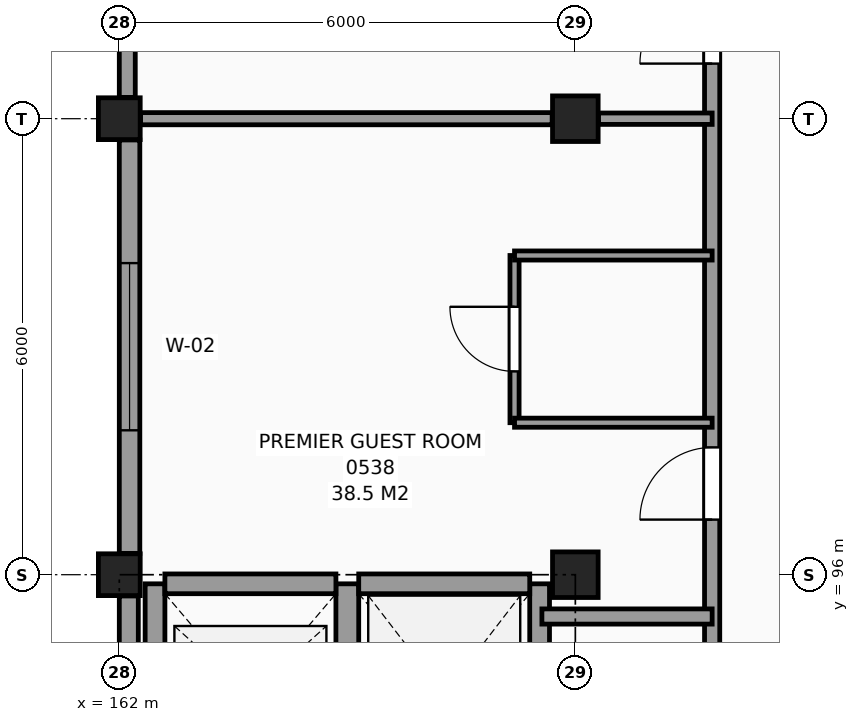
"""IFC4 building model, lengths in metres.
Left out: names, types, materials, properties, quantities, classifications, styles, units other than length and angle.
Written with IfcOpenShell. Run it as: python <this file> out.ifc"""

import sys

from ifc_helpers import new_model, si_unit, direction, frame, frame_2d, origin, origin_2d, place, context, subcontext, project, spatial, rectangle, extrude, element, fill, save


model = new_model("IFC4")
c1 = context("Model", 3, precision=1e-05, world=origin(), true_north=direction((0.0, 1.0)))
c2 = subcontext(c1, "Body", "Model", "MODEL_VIEW")
j1 = project(units=[si_unit("LENGTHUNIT", "METRE"), si_unit("PLANEANGLEUNIT", "RADIAN")], contexts=[c1])
p1 = place(None, origin())
s1 = spatial("IfcSite", under=j1, at=p1, CompositionType="ELEMENT")
p2 = place(p1, origin())
s2 = spatial("IfcBuilding", under=s1, at=p2, CompositionType="ELEMENT")
p3 = place(p2, frame((0.0, 0.0, 24.6)))
s3 = spatial("IfcBuildingStorey", under=s2, at=p3, CompositionType="ELEMENT", Elevation=24.6)
for number, where, z_axis, x_axis in (
    (1, (162.0, 96.0, 0.0), (0.0, 0.0, 1.0), (1.0, 0.0, 0.0)),
    (2, (162.0, 102.0, 0.0), (0.0, 0.0, 1.0), (1.0, 0.0, 0.0)),
):
    element("IfcColumn", number, at=place(p3, frame(where, z_axis=z_axis, x_axis=x_axis)), inside=s3, PredefinedType="COLUMN", context=c2, shape_type="SweptSolid", body=[
        extrude(rectangle(XDim=0.55, YDim=0.55, at=origin_2d()), origin(), (0.0, 0.0, 1.0), 3.6),
    ])
for number, where, z_axis, x_axis in (
    (3, (168.0, 96.0, 0.0), (0.0, 0.0, 1.0), (1.0, 0.0, 0.0)),
    (4, (168.0, 102.0, 0.0), (0.0, 0.0, 1.0), (1.0, 0.0, 0.0)),
):
    element("IfcColumn", number, at=place(p3, frame(where, z_axis=z_axis, x_axis=x_axis)), inside=s3, PredefinedType="COLUMN", context=c2, shape_type="SweptSolid", body=[
        extrude(rectangle(XDim=0.6, YDim=0.6, at=origin_2d()), origin(), (0.0, 0.0, 1.0), 3.6),
    ])
p4 = place(p3, frame((162.105, 107.72, 0.0), z_axis=(0.0, 0.0, 1.0), x_axis=(0.0, -1.0, 0.0)))
e5 = element("IfcWall", 5, at=p4, inside=s3, PredefinedType="SOLIDWALL", context=c2, shape_type="SweptSolid", body=[
    extrude(rectangle(XDim=5.44, YDim=0.21, at=frame_2d((2.72, 0.0))), origin(), (0.0, 0.0, 1.0), 2.73),
])
p5 = place(p4, frame((1.62, 0.0, 0.8)))
e6 = element("IfcOpeningElement", 6, at=p5, cuts=e5, PredefinedType="OPENING", context=c2, shape_type="SweptSolid", body=[
    extrude(rectangle(XDim=2.2, YDim=1.75, at=frame_2d((1.1, 0.875))), frame((0.0, 0.115, 0.0), z_axis=(0.0, -1.0, 0.0), x_axis=(1.0, 0.0, 0.0)), (0.0, 0.0, 1.0), 0.23),
])
p6 = place(p3, frame((162.135, 101.72, 0.0), z_axis=(0.0, 0.0, 1.0), x_axis=(0.0, -1.0, 0.0)))
e7 = element("IfcWall", 7, at=p6, inside=s3, PredefinedType="SOLIDWALL", context=c2, shape_type="SweptSolid", body=[
    extrude(rectangle(XDim=5.44, YDim=0.27, at=frame_2d((2.72, 0.0))), origin(), (0.0, 0.0, 1.0), 2.73),
])
p7 = place(p6, frame((1.62, 0.0, 0.8)))
e8 = element("IfcOpeningElement", 8, at=p7, cuts=e7, PredefinedType="OPENING", context=c2, shape_type="SweptSolid", body=[
    extrude(rectangle(XDim=2.2, YDim=1.75, at=frame_2d((1.1, 0.875))), frame((0.0, 0.145, 0.0), z_axis=(0.0, -1.0, 0.0), x_axis=(1.0, 0.0, 0.0)), (0.0, 0.0, 1.0), 0.29),
])
p8 = place(p3, frame((162.125, 95.72, 0.0), z_axis=(0.0, 0.0, 1.0), x_axis=(0.0, -1.0, 0.0)))
e9 = element("IfcWall", 9, at=p8, inside=s3, PredefinedType="SOLIDWALL", context=c2, shape_type="SweptSolid", body=[
    extrude(rectangle(XDim=5.44, YDim=0.25, at=frame_2d((2.72, 0.0))), origin(), (0.0, 0.0, 1.0), 2.73),
])
p9 = place(p3, frame((162.47, 92.97, 0.0), z_axis=(0.0, 0.0, 1.0), x_axis=(0.0, 1.0, 0.0)))
e10 = element("IfcWall", 10, at=p9, inside=s3, PredefinedType="SHEAR", context=c2, shape_type="SweptSolid", body=[
    extrude(rectangle(XDim=2.91, YDim=0.26, at=frame_2d((1.455, 0.0))), origin(), (0.0, 0.0, 1.0), 3.6),
])
p10 = place(p3, frame((165.0, 92.97, 0.0), z_axis=(0.0, 0.0, 1.0), x_axis=(0.0, 1.0, 0.0)))
e11 = element("IfcWall", 11, at=p10, inside=s3, PredefinedType="SHEAR", context=c2, shape_type="SweptSolid", body=[
    extrude(rectangle(XDim=2.91, YDim=0.3, at=frame_2d((1.455, 0.0))), origin(), (0.0, 0.0, 1.0), 3.6),
])
p11 = place(p3, frame((162.6, 95.88, 0.0), z_axis=(0.0, 0.0, 1.0), x_axis=(1.0, 0.0, 0.0)))
e12 = element("IfcWall", 12, at=p11, inside=s3, PredefinedType="SHEAR", context=c2, shape_type="SweptSolid", body=[
    extrude(rectangle(XDim=2.25, YDim=0.26, at=frame_2d((1.125, 0.0))), origin(), (0.0, 0.0, 1.0), 3.6),
])
p12 = place(p3, frame((167.53, 92.97, 0.0), z_axis=(0.0, 0.0, 1.0), x_axis=(0.0, 1.0, 0.0)))
e13 = element("IfcWall", 13, at=p12, inside=s3, PredefinedType="SHEAR", context=c2, shape_type="SweptSolid", body=[
    extrude(rectangle(XDim=2.91, YDim=0.26, at=frame_2d((1.455, 0.0))), origin(), (0.0, 0.0, 1.0), 3.6),
])
p13 = place(p3, frame((165.15, 95.88, 0.0), z_axis=(0.0, 0.0, 1.0), x_axis=(1.0, 0.0, 0.0)))
e14 = element("IfcWall", 14, at=p13, inside=s3, PredefinedType="SHEAR", context=c2, shape_type="SweptSolid", body=[
    extrude(rectangle(XDim=2.25, YDim=0.26, at=frame_2d((1.125, 0.0))), origin(), (0.0, 0.0, 1.0), 3.6),
])
p14 = place(p3, frame((167.2, 98.0, 0.0), z_axis=(0.0, 0.0, 1.0), x_axis=(0.0, 1.0, 0.0)))
e15 = element("IfcWall", 15, at=p14, inside=s3, PredefinedType="PARTITIONING", context=c2, shape_type="SweptSolid", body=[
    extrude(rectangle(XDim=2.2, YDim=0.12, at=frame_2d((1.1, 0.0))), origin(), (0.0, 0.0, 1.0), 3.38),
])
p15 = place(p14, frame((0.675, 0.0, 0.0)))
e16 = element("IfcOpeningElement", 16, at=p15, cuts=e15, PredefinedType="OPENING", context=c2, shape_type="SweptSolid", body=[
    extrude(rectangle(XDim=0.85, YDim=2.1, at=frame_2d((0.425, 1.05))), frame((0.0, 0.07, 0.0), z_axis=(0.0, -1.0, 0.0), x_axis=(1.0, 0.0, 0.0)), (0.0, 0.0, 1.0), 0.14),
])
p16 = place(p3, frame((169.8, 42.215, 0.0), z_axis=(0.0, 0.0, 1.0), x_axis=(0.0, 1.0, 0.0)))
e17 = element("IfcWall", 17, at=p16, inside=s3, PredefinedType="PARTITIONING", context=c2, shape_type="SweptSolid", body=[
    extrude(rectangle(XDim=65.605, YDim=0.2, at=frame_2d((32.802, 0.0))), origin(), (0.0, 0.0, 1.0), 3.38),
])
p17 = place(p16, frame((50.185, 0.0, 0.0)))
e18 = element("IfcOpeningElement", 18, at=p17, cuts=e17, PredefinedType="OPENING", context=c2, shape_type="SweptSolid", body=[
    extrude(rectangle(XDim=1.2, YDim=2.2, at=frame_2d((0.6, 1.1))), frame((0.0, 0.11, 0.0), z_axis=(0.0, -1.0, 0.0), x_axis=(1.0, 0.0, 0.0)), (0.0, 0.0, 1.0), 0.22),
])
p18 = place(p16, frame((0.46, 0.0, 0.0)))
e19 = element("IfcOpeningElement", 19, at=p18, cuts=e17, PredefinedType="OPENING", context=c2, shape_type="SweptSolid", body=[
    extrude(rectangle(XDim=0.95, YDim=2.1, at=frame_2d((0.475, 1.05))), frame((0.0, 0.11, 0.0), z_axis=(0.0, -1.0, 0.0), x_axis=(1.0, 0.0, 0.0)), (0.0, 0.0, 1.0), 0.22),
])
p19 = place(p16, frame((6.51, 0.0, 0.0)))
e20 = element("IfcOpeningElement", 20, at=p19, cuts=e17, PredefinedType="OPENING", context=c2, shape_type="SweptSolid", body=[
    extrude(rectangle(XDim=0.95, YDim=2.1, at=frame_2d((0.475, 1.05))), frame((0.0, 0.11, 0.0), z_axis=(0.0, -1.0, 0.0), x_axis=(1.0, 0.0, 0.0)), (0.0, 0.0, 1.0), 0.22),
])
p20 = place(p16, frame((12.51, 0.0, 0.0)))
e21 = element("IfcOpeningElement", 21, at=p20, cuts=e17, PredefinedType="OPENING", context=c2, shape_type="SweptSolid", body=[
    extrude(rectangle(XDim=0.95, YDim=2.1, at=frame_2d((0.475, 1.05))), frame((0.0, 0.11, 0.0), z_axis=(0.0, -1.0, 0.0), x_axis=(1.0, 0.0, 0.0)), (0.0, 0.0, 1.0), 0.22),
])
p21 = place(p16, frame((18.51, 0.0, 0.0)))
e22 = element("IfcOpeningElement", 22, at=p21, cuts=e17, PredefinedType="OPENING", context=c2, shape_type="SweptSolid", body=[
    extrude(rectangle(XDim=0.95, YDim=2.1, at=frame_2d((0.475, 1.05))), frame((0.0, 0.11, 0.0), z_axis=(0.0, -1.0, 0.0), x_axis=(1.0, 0.0, 0.0)), (0.0, 0.0, 1.0), 0.22),
])
p22 = place(p16, frame((24.51, 0.0, 0.0)))
e23 = element("IfcOpeningElement", 23, at=p22, cuts=e17, PredefinedType="OPENING", context=c2, shape_type="SweptSolid", body=[
    extrude(rectangle(XDim=0.95, YDim=2.1, at=frame_2d((0.475, 1.05))), frame((0.0, 0.11, 0.0), z_axis=(0.0, -1.0, 0.0), x_axis=(1.0, 0.0, 0.0)), (0.0, 0.0, 1.0), 0.22),
])
p23 = place(p16, frame((30.51, 0.0, 0.0)))
e24 = element("IfcOpeningElement", 24, at=p23, cuts=e17, PredefinedType="OPENING", context=c2, shape_type="SweptSolid", body=[
    extrude(rectangle(XDim=0.95, YDim=2.1, at=frame_2d((0.475, 1.05))), frame((0.0, 0.11, 0.0), z_axis=(0.0, -1.0, 0.0), x_axis=(1.0, 0.0, 0.0)), (0.0, 0.0, 1.0), 0.22),
])
p24 = place(p16, frame((54.51, 0.0, 0.0)))
e25 = element("IfcOpeningElement", 25, at=p24, cuts=e17, PredefinedType="OPENING", context=c2, shape_type="SweptSolid", body=[
    extrude(rectangle(XDim=0.95, YDim=2.1, at=frame_2d((0.475, 1.05))), frame((0.0, 0.11, 0.0), z_axis=(0.0, -1.0, 0.0), x_axis=(1.0, 0.0, 0.0)), (0.0, 0.0, 1.0), 0.22),
])
p25 = place(p16, frame((60.51, 0.0, 0.0)))
e26 = element("IfcOpeningElement", 26, at=p25, cuts=e17, PredefinedType="OPENING", context=c2, shape_type="SweptSolid", body=[
    extrude(rectangle(XDim=0.95, YDim=2.1, at=frame_2d((0.475, 1.05))), frame((0.0, 0.11, 0.0), z_axis=(0.0, -1.0, 0.0), x_axis=(1.0, 0.0, 0.0)), (0.0, 0.0, 1.0), 0.22),
])
p26 = place(p3, frame((167.56, 95.45, 0.0), z_axis=(0.0, 0.0, 1.0), x_axis=(1.0, 0.0, 0.0)))
e27 = element("IfcWall", 27, at=p26, inside=s3, PredefinedType="PARTITIONING", context=c2, shape_type="SweptSolid", body=[
    extrude(rectangle(XDim=2.24, YDim=0.2, at=frame_2d((1.12, 0.0))), origin(), (0.0, 0.0, 1.0), 3.38),
])
for number, where, z_axis, x_axis in (
    (28, (167.2, 98.0, 0.0), (0.0, 0.0, 1.0), (1.0, 0.0, 0.0)),
    (29, (167.2, 100.2, 0.0), (0.0, 0.0, 1.0), (1.0, 0.0, 0.0)),
):
    element("IfcWall", number, at=place(p3, frame(where, z_axis=z_axis, x_axis=x_axis)), inside=s3, PredefinedType="PARTITIONING", context=c2, shape_type="SweptSolid", body=[
        extrude(rectangle(XDim=2.6, YDim=0.12, at=frame_2d((1.3, 0.0))), origin(), (0.0, 0.0, 1.0), 3.38),
    ])
p27 = place(p3, frame((162.28, 102.0, 0.0), z_axis=(0.0, 0.0, 1.0), x_axis=(1.0, 0.0, 0.0)))
e30 = element("IfcWall", 30, at=p27, inside=s3, PredefinedType="PARTITIONING", context=c2, shape_type="SweptSolid", body=[
    extrude(rectangle(XDim=5.415, YDim=0.16, at=frame_2d((2.708, 0.0))), origin(), (0.0, 0.0, 1.0), 2.93),
])
p28 = place(p3, frame((168.305, 102.0, 0.0), z_axis=(0.0, 0.0, 1.0), x_axis=(1.0, 0.0, 0.0)))
e31 = element("IfcWall", 31, at=p28, inside=s3, PredefinedType="PARTITIONING", context=c2, shape_type="SweptSolid", body=[
    extrude(rectangle(XDim=1.495, YDim=0.15, at=frame_2d((0.748, 0.0))), origin(), (0.0, 0.0, 1.0), 3.09),
])
p29 = place(p7, origin())
e32 = element("IfcWindow", 32, at=p29, inside=s3, PartitioningType="SINGLE_PANEL", PredefinedType="WINDOW", context=c2, shape_type="SweptSolid", body=[
    extrude(rectangle(XDim=2.2, YDim=1.75, at=frame_2d((1.1, 0.875))), frame((0.0, 0.03, 0.0), z_axis=(0.0, -1.0, 0.0), x_axis=(1.0, 0.0, 0.0)), (0.0, 0.0, 1.0), 0.06),
])
fill(e8, e32)
p30 = place(p15, origin())
e33 = element("IfcDoor", 33, at=p30, inside=s3, OperationType="SINGLE_SWING_RIGHT", PredefinedType="DOOR", context=c2, shape_type="SweptSolid", body=[
    extrude(rectangle(XDim=0.85, YDim=2.1, at=frame_2d((0.425, 1.05))), frame((0.0, 0.025, 0.0), z_axis=(0.0, -1.0, 0.0), x_axis=(1.0, 0.0, 0.0)), (0.0, 0.0, 1.0), 0.05),
])
fill(e16, e33)
p31 = place(p24, origin())
e34 = element("IfcDoor", 34, at=p31, inside=s3, OperationType="SINGLE_SWING_LEFT", PredefinedType="DOOR", context=c2, shape_type="SweptSolid", body=[
    extrude(rectangle(XDim=0.95, YDim=2.1, at=frame_2d((0.475, 1.05))), frame((0.0, 0.025, 0.0), z_axis=(0.0, -1.0, 0.0), x_axis=(1.0, 0.0, 0.0)), (0.0, 0.0, 1.0), 0.05),
])
fill(e25, e34)
p32 = place(p25, origin())
e35 = element("IfcDoor", 35, at=p32, inside=s3, OperationType="SINGLE_SWING_LEFT", PredefinedType="DOOR", context=c2, shape_type="SweptSolid", body=[
    extrude(rectangle(XDim=0.95, YDim=2.1, at=frame_2d((0.475, 1.05))), frame((0.0, 0.025, 0.0), z_axis=(0.0, -1.0, 0.0), x_axis=(1.0, 0.0, 0.0)), (0.0, 0.0, 1.0), 0.05),
])
fill(e26, e35)
save(model, sys.argv[1])
